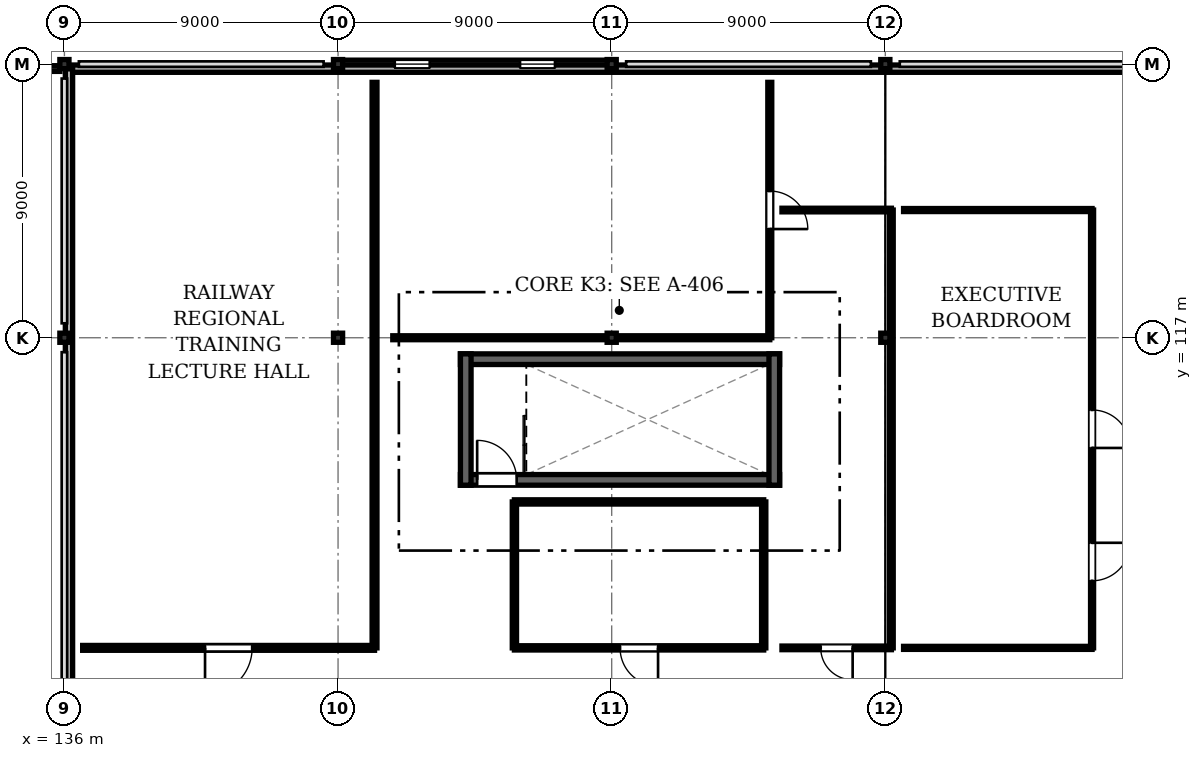
"""IFC4 building model, lengths in metres.
Left out: names, types, materials, properties, quantities, classifications, styles, units other than length and angle.
Written with IfcOpenShell. Run it as: python <this file> out.ifc"""

import sys

from ifc_helpers import new_model, si_unit, direction, frame, frame_2d, origin, origin_2d, place, context, subcontext, project, spatial, rectangle, i_section, extrude, element, fill, save


model = new_model("IFC4")
c1 = context("Model", 3, precision=1e-05, world=origin(), true_north=direction((0.0, 1.0)))
c2 = subcontext(c1, "Body", "Model", "MODEL_VIEW")
j1 = project(units=[si_unit("LENGTHUNIT", "METRE"), si_unit("PLANEANGLEUNIT", "RADIAN")], contexts=[c1])
p1 = place(None, origin())
s1 = spatial("IfcSite", under=j1, at=p1, CompositionType="ELEMENT")
p2 = place(p1, origin())
s2 = spatial("IfcBuilding", under=s1, at=p2, CompositionType="ELEMENT")
p3 = place(p2, frame((0.0, 0.0, 20.8)))
s3 = spatial("IfcBuildingStorey", under=s2, at=p3, CompositionType="ELEMENT", Elevation=20.8)
for number, where, z_axis, x_axis in (
    (1, (136.0, 117.0, 0.0), (0.0, 0.0, 1.0), (1.0, 0.0, 0.0)),
    (2, (136.0, 126.0, 0.0), (0.0, 0.0, 1.0), (1.0, 0.0, 0.0)),
    (3, (145.0, 117.0, 0.0), (0.0, 0.0, 1.0), (1.0, 0.0, 0.0)),
    (4, (145.0, 126.0, 0.0), (0.0, 0.0, 1.0), (1.0, 0.0, 0.0)),
    (5, (154.0, 117.0, 0.0), (0.0, 0.0, 1.0), (1.0, 0.0, 0.0)),
    (6, (154.0, 126.0, 0.0), (0.0, 0.0, 1.0), (1.0, 0.0, 0.0)),
    (7, (163.0, 117.0, 0.0), (0.0, 0.0, 1.0), (1.0, 0.0, 0.0)),
    (8, (163.0, 126.0, 0.0), (0.0, 0.0, 1.0), (1.0, 0.0, 0.0)),
):
    element("IfcColumn", number, at=place(p3, frame(where, z_axis=z_axis, x_axis=x_axis)), inside=s3, PredefinedType="COLUMN", context=c2, shape_type="SweptSolid", body=[
        extrude(i_section(OverallWidth=0.3, OverallDepth=0.3, WebThickness=0.01, FlangeThickness=0.015, FilletRadius=0.018, at=origin_2d()), origin(), (0.0, 0.0, 1.0), 2.85),
    ])
p4 = place(p3, frame((145.005, 126.0, 0.0), z_axis=(0.0, 0.0, 1.0), x_axis=(1.0, 0.0, 0.0)))
e9 = element("IfcWall", 9, at=p4, inside=s3, PredefinedType="SOLIDWALL", context=c2, shape_type="SweptSolid", body=[
    extrude(rectangle(XDim=8.99, YDim=0.26, at=frame_2d((4.495, 0.0))), origin(), (0.0, 0.0, 1.0), 2.23),
])
p5 = place(p4, frame((1.86, 0.0, 0.7)))
e10 = element("IfcOpeningElement", 10, at=p5, cuts=e9, PredefinedType="OPENING", context=c2, shape_type="SweptSolid", body=[
    extrude(rectangle(XDim=1.15, YDim=1.45, at=frame_2d((0.575, 0.725))), frame((0.0, 0.14, 0.0), z_axis=(0.0, -1.0, 0.0), x_axis=(1.0, 0.0, 0.0)), (0.0, 0.0, 1.0), 0.28),
])
p6 = place(p4, frame((5.98, 0.0, 0.7)))
e11 = element("IfcOpeningElement", 11, at=p6, cuts=e9, PredefinedType="OPENING", context=c2, shape_type="SweptSolid", body=[
    extrude(rectangle(XDim=1.15, YDim=1.45, at=frame_2d((0.575, 0.725))), frame((0.0, 0.14, 0.0), z_axis=(0.0, -1.0, 0.0), x_axis=(1.0, 0.0, 0.0)), (0.0, 0.0, 1.0), 0.28),
])
p7 = place(p3, frame((126.15, 125.85, 0.0), z_axis=(0.0, 0.0, 1.0), x_axis=(1.0, 0.0, 0.0)))
e12 = element("IfcWall", 12, at=p7, inside=s3, PredefinedType="PARAPET", context=c2, shape_type="SweptSolid", body=[
    extrude(rectangle(XDim=9.7, YDim=0.18, at=frame_2d((4.85, 0.0))), origin(), (0.0, 0.0, 1.0), 1.15),
])
p8 = place(p3, frame((187.85, 125.85, 2.85), z_axis=(0.0, 0.0, 1.0), x_axis=(-1.0, 0.0, 0.0)))
e13 = element("IfcWall", 13, at=p8, inside=s3, PredefinedType="PARAPET", context=c2, shape_type="SweptSolid", body=[
    extrude(rectangle(XDim=51.7, YDim=0.24, at=frame_2d((25.85, 0.0))), origin(), (0.0, 0.0, 1.0), 0.34),
])
p9 = place(p3, frame((136.15, 125.85, 2.85), z_axis=(0.0, 0.0, 1.0), x_axis=(0.0, -1.0, 0.0)))
e14 = element("IfcWall", 14, at=p9, inside=s3, PredefinedType="PARAPET", context=c2, shape_type="SweptSolid", body=[
    extrude(rectangle(XDim=22.2, YDim=0.24, at=frame_2d((11.1, 0.0))), origin(), (0.0, 0.0, 1.0), 0.34),
])
p10 = place(p3, frame((149.025, 112.325, 0.0), z_axis=(0.0, 0.0, 1.0), x_axis=(1.0, 0.0, 0.0)))
e15 = element("IfcWall", 15, at=p10, inside=s3, PredefinedType="SHEAR", context=c2, shape_type="SweptSolid", body=[
    extrude(rectangle(XDim=10.498, YDim=0.35, at=frame_2d((5.249, 0.0))), origin(), (0.0, 0.0, 1.0), 2.645),
])
p11 = place(p10, frame((0.55, 0.0, 0.0)))
e16 = element("IfcOpeningElement", 16, at=p11, cuts=e15, PredefinedType="OPENING", context=c2, shape_type="SweptSolid", body=[
    extrude(rectangle(XDim=1.3, YDim=2.1, at=frame_2d((0.65, 1.05))), frame((0.0, 0.185, 0.0), z_axis=(0.0, -1.0, 0.0), x_axis=(1.0, 0.0, 0.0)), (0.0, 0.0, 1.0), 0.37),
])
p12 = place(p3, frame((159.522, 116.295, 0.0), z_axis=(0.0, 0.0, 1.0), x_axis=(-1.0, 0.0, 0.0)))
e17 = element("IfcWall", 17, at=p12, inside=s3, PredefinedType="SHEAR", context=c2, shape_type="SweptSolid", body=[
    extrude(rectangle(XDim=10.498, YDim=0.35, at=frame_2d((5.249, 0.0))), origin(), (0.0, 0.0, 1.0), 2.645),
])
for number, where, z_axis, x_axis in (
    (18, (159.347, 112.15, 0.0), (0.0, 0.0, 1.0), (0.0, 1.0, 0.0)),
    (19, (149.2, 116.47, 0.0), (0.0, 0.0, 1.0), (0.0, -1.0, 0.0)),
):
    element("IfcWall", number, at=place(p3, frame(where, z_axis=z_axis, x_axis=x_axis)), inside=s3, PredefinedType="SHEAR", context=c2, shape_type="SweptSolid", body=[
        extrude(rectangle(XDim=4.32, YDim=0.35, at=frame_2d((2.16, 0.0))), origin(), (0.0, 0.0, 1.0), 2.645),
    ])
p13 = place(p3, frame((146.2, 106.8, 0.0), z_axis=(0.0, 0.0, 1.0), x_axis=(-1.0, 0.0, 0.0)))
e20 = element("IfcWall", 20, at=p13, inside=s3, PredefinedType="PARTITIONING", context=c2, shape_type="SweptSolid", body=[
    extrude(rectangle(XDim=9.6, YDim=0.16, at=frame_2d((4.8, 0.0))), origin(), (0.0, 0.0, 1.0), 2.18),
])
p14 = place(p13, frame((4.025, 0.0, 0.0)))
e21 = element("IfcOpeningElement", 21, at=p14, cuts=e20, PredefinedType="OPENING", context=c2, shape_type="SweptSolid", body=[
    extrude(rectangle(XDim=1.55, YDim=2.1, at=frame_2d((0.775, 1.05))), frame((0.0, 0.09, 0.0), z_axis=(0.0, -1.0, 0.0), x_axis=(1.0, 0.0, 0.0)), (0.0, 0.0, 1.0), 0.18),
])
p15 = place(p3, frame((146.2, 125.4, 0.0), z_axis=(0.0, 0.0, 1.0), x_axis=(0.0, -1.0, 0.0)))
e22 = element("IfcWall", 22, at=p15, inside=s3, PredefinedType="PARTITIONING", context=c2, shape_type="SweptSolid", body=[
    extrude(rectangle(XDim=18.6, YDim=0.16, at=frame_2d((9.3, 0.0))), origin(), (0.0, 0.0, 1.0), 2.23),
])
p16 = place(p3, frame((159.0, 106.8, 0.0), z_axis=(0.0, 0.0, 1.0), x_axis=(-1.0, 0.0, 0.0)))
e23 = element("IfcWall", 23, at=p16, inside=s3, PredefinedType="PARTITIONING", context=c2, shape_type="SweptSolid", body=[
    extrude(rectangle(XDim=8.2, YDim=0.14, at=frame_2d((4.1, 0.0))), origin(), (0.0, 0.0, 1.0), 2.18),
])
p17 = place(p16, frame((3.475, 0.0, 0.0)))
e24 = element("IfcOpeningElement", 24, at=p17, cuts=e23, PredefinedType="OPENING", context=c2, shape_type="SweptSolid", body=[
    extrude(rectangle(XDim=1.25, YDim=2.1, at=frame_2d((0.625, 1.05))), frame((0.0, 0.08, 0.0), z_axis=(0.0, -1.0, 0.0), x_axis=(1.0, 0.0, 0.0)), (0.0, 0.0, 1.0), 0.16),
])
p18 = place(p3, frame((150.8, 111.6, 0.0), z_axis=(0.0, 0.0, 1.0), x_axis=(1.0, 0.0, 0.0)))
e25 = element("IfcWall", 25, at=p18, inside=s3, PredefinedType="PARTITIONING", context=c2, shape_type="SweptSolid", body=[
    extrude(rectangle(XDim=8.2, YDim=0.14, at=frame_2d((4.1, 0.0))), origin(), (0.0, 0.0, 1.0), 2.18),
])
p19 = place(p3, frame((150.8, 106.8, 0.0), z_axis=(0.0, 0.0, 1.0), x_axis=(0.0, 1.0, 0.0)))
e26 = element("IfcWall", 26, at=p19, inside=s3, PredefinedType="PARTITIONING", context=c2, shape_type="SweptSolid", body=[
    extrude(rectangle(XDim=4.8, YDim=0.14, at=frame_2d((2.4, 0.0))), origin(), (0.0, 0.0, 1.0), 2.62),
])
p20 = place(p3, frame((159.0, 111.6, 0.0), z_axis=(0.0, 0.0, 1.0), x_axis=(0.0, -1.0, 0.0)))
e27 = element("IfcWall", 27, at=p20, inside=s3, PredefinedType="PARTITIONING", context=c2, shape_type="SweptSolid", body=[
    extrude(rectangle(XDim=4.8, YDim=0.14, at=frame_2d((2.4, 0.0))), origin(), (0.0, 0.0, 1.0), 2.22),
])
p21 = place(p3, frame((159.2, 117.0, 0.0), z_axis=(0.0, 0.0, 1.0), x_axis=(-1.0, 0.0, 0.0)))
e28 = element("IfcWall", 28, at=p21, inside=s3, PredefinedType="PARTITIONING", context=c2, shape_type="SweptSolid", body=[
    extrude(rectangle(XDim=12.4, YDim=0.13, at=frame_2d((6.2, 0.0))), origin(), (0.0, 0.0, 1.0), 2.18),
])
p22 = place(p3, frame((159.2, 125.4, 0.0), z_axis=(0.0, 0.0, 1.0), x_axis=(0.0, -1.0, 0.0)))
e29 = element("IfcWall", 29, at=p22, inside=s3, PredefinedType="PARTITIONING", context=c2, shape_type="SweptSolid", body=[
    extrude(rectangle(XDim=8.4, YDim=0.13, at=frame_2d((4.2, 0.0))), origin(), (0.0, 0.0, 1.0), 2.22),
])
p23 = place(p22, frame((3.575, 0.0, 0.0)))
e30 = element("IfcOpeningElement", 30, at=p23, cuts=e29, PredefinedType="OPENING", context=c2, shape_type="SweptSolid", body=[
    extrude(rectangle(XDim=1.25, YDim=2.1, at=frame_2d((0.625, 1.05))), frame((0.0, 0.075, 0.0), z_axis=(0.0, -1.0, 0.0), x_axis=(1.0, 0.0, 0.0)), (0.0, 0.0, 1.0), 0.15),
])
p24 = place(p3, frame((163.2, 106.8, 0.0), z_axis=(0.0, 0.0, 1.0), x_axis=(-1.0, 0.0, 0.0)))
e31 = element("IfcWall", 31, at=p24, inside=s3, PredefinedType="PARTITIONING", context=c2, shape_type="SweptSolid", body=[
    extrude(rectangle(XDim=3.6, YDim=0.12, at=frame_2d((1.8, 0.0))), origin(), (0.0, 0.0, 1.0), 2.18),
])
p25 = place(p24, frame((1.275, 0.0, 0.0)))
e32 = element("IfcOpeningElement", 32, at=p25, cuts=e31, PredefinedType="OPENING", context=c2, shape_type="SweptSolid", body=[
    extrude(rectangle(XDim=1.05, YDim=2.1, at=frame_2d((0.525, 1.05))), frame((0.0, 0.07, 0.0), z_axis=(0.0, -1.0, 0.0), x_axis=(1.0, 0.0, 0.0)), (0.0, 0.0, 1.0), 0.14),
])
p26 = place(p3, frame((159.6, 121.2, 0.0), z_axis=(0.0, 0.0, 1.0), x_axis=(1.0, 0.0, 0.0)))
e33 = element("IfcWall", 33, at=p26, inside=s3, PredefinedType="PARTITIONING", context=c2, shape_type="SweptSolid", body=[
    extrude(rectangle(XDim=3.6, YDim=0.12, at=frame_2d((1.8, 0.0))), origin(), (0.0, 0.0, 1.0), 2.23),
])
p27 = place(p3, frame((163.2, 121.2, 0.0), z_axis=(0.0, 0.0, 1.0), x_axis=(0.0, -1.0, 0.0)))
e34 = element("IfcWall", 34, at=p27, inside=s3, PredefinedType="PARTITIONING", context=c2, shape_type="SweptSolid", body=[
    extrude(rectangle(XDim=14.4, YDim=0.12, at=frame_2d((7.2, 0.0))), origin(), (0.0, 0.0, 1.0), 2.18),
])
p28 = place(p3, frame((169.8, 106.8, 0.0), z_axis=(0.0, 0.0, 1.0), x_axis=(-1.0, 0.0, 0.0)))
e35 = element("IfcWall", 35, at=p28, inside=s3, PredefinedType="PARTITIONING", context=c2, shape_type="SweptSolid", body=[
    extrude(rectangle(XDim=6.2, YDim=0.1, at=frame_2d((3.1, 0.0))), origin(), (0.0, 0.0, 1.0), 2.18),
])
p29 = place(p3, frame((163.6, 121.2, 0.0), z_axis=(0.0, 0.0, 1.0), x_axis=(1.0, 0.0, 0.0)))
e36 = element("IfcWall", 36, at=p29, inside=s3, PredefinedType="PARTITIONING", context=c2, shape_type="SweptSolid", body=[
    extrude(rectangle(XDim=6.2, YDim=0.1, at=frame_2d((3.1, 0.0))), origin(), (0.0, 0.0, 1.0), 2.23),
])
p30 = place(p3, frame((169.8, 121.2, 0.0), z_axis=(0.0, 0.0, 1.0), x_axis=(0.0, -1.0, 0.0)))
e37 = element("IfcWall", 37, at=p30, inside=s3, PredefinedType="PARTITIONING", context=c2, shape_type="SweptSolid", body=[
    extrude(rectangle(XDim=14.4, YDim=0.1, at=frame_2d((7.2, 0.0))), origin(), (0.0, 0.0, 1.0), 2.23),
])
p31 = place(p30, frame((6.575, 0.0, 0.0)))
e38 = element("IfcOpeningElement", 38, at=p31, cuts=e37, PredefinedType="OPENING", context=c2, shape_type="SweptSolid", body=[
    extrude(rectangle(XDim=1.25, YDim=2.1, at=frame_2d((0.625, 1.05))), frame((0.0, 0.06, 0.0), z_axis=(0.0, -1.0, 0.0), x_axis=(1.0, 0.0, 0.0)), (0.0, 0.0, 1.0), 0.12),
])
p32 = place(p30, frame((10.944, 0.0, 0.0)))
e39 = element("IfcOpeningElement", 39, at=p32, cuts=e37, PredefinedType="OPENING", context=c2, shape_type="SweptSolid", body=[
    extrude(rectangle(XDim=1.25, YDim=2.1, at=frame_2d((0.625, 1.05))), frame((0.0, 0.06, 0.0), z_axis=(0.0, -1.0, 0.0), x_axis=(1.0, 0.0, 0.0)), (0.0, 0.0, 1.0), 0.12),
])
p33 = place(p5, origin())
e40 = element("IfcWindow", 40, at=p33, inside=s3, PartitioningType="SINGLE_PANEL", PredefinedType="WINDOW", context=c2, shape_type="SweptSolid", body=[
    extrude(rectangle(XDim=1.15, YDim=1.45, at=frame_2d((0.575, 0.725))), frame((0.0, 0.03, 0.0), z_axis=(0.0, -1.0, 0.0), x_axis=(1.0, 0.0, 0.0)), (0.0, 0.0, 1.0), 0.06),
])
fill(e10, e40)
p34 = place(p6, origin())
e41 = element("IfcWindow", 41, at=p34, inside=s3, PartitioningType="SINGLE_PANEL", PredefinedType="WINDOW", context=c2, shape_type="SweptSolid", body=[
    extrude(rectangle(XDim=1.15, YDim=1.45, at=frame_2d((0.575, 0.725))), frame((0.0, 0.03, 0.0), z_axis=(0.0, -1.0, 0.0), x_axis=(1.0, 0.0, 0.0)), (0.0, 0.0, 1.0), 0.06),
])
fill(e11, e41)
p35 = place(p11, origin())
e42 = element("IfcDoor", 42, at=p35, inside=s3, OperationType="SINGLE_SWING_LEFT", PredefinedType="DOOR", context=c2, shape_type="SweptSolid", body=[
    extrude(rectangle(XDim=1.3, YDim=2.1, at=frame_2d((0.65, 1.05))), frame((0.0, 0.025, 0.0), z_axis=(0.0, -1.0, 0.0), x_axis=(1.0, 0.0, 0.0)), (0.0, 0.0, 1.0), 0.05),
])
fill(e16, e42)
p36 = place(p14, origin())
e43 = element("IfcDoor", 43, at=p36, inside=s3, OperationType="SINGLE_SWING_RIGHT", PredefinedType="DOOR", context=c2, shape_type="SweptSolid", body=[
    extrude(rectangle(XDim=1.55, YDim=2.1, at=frame_2d((0.775, 1.05))), frame((0.0, 0.025, 0.0), z_axis=(0.0, -1.0, 0.0), x_axis=(1.0, 0.0, 0.0)), (0.0, 0.0, 1.0), 0.05),
])
fill(e21, e43)
p37 = place(p17, origin())
e44 = element("IfcDoor", 44, at=p37, inside=s3, OperationType="SINGLE_SWING_LEFT", PredefinedType="DOOR", context=c2, shape_type="SweptSolid", body=[
    extrude(rectangle(XDim=1.25, YDim=2.1, at=frame_2d((0.625, 1.05))), frame((0.0, 0.025, 0.0), z_axis=(0.0, -1.0, 0.0), x_axis=(1.0, 0.0, 0.0)), (0.0, 0.0, 1.0), 0.05),
])
fill(e24, e44)
p38 = place(p23, origin())
e45 = element("IfcDoor", 45, at=p38, inside=s3, OperationType="SINGLE_SWING_RIGHT", PredefinedType="DOOR", context=c2, shape_type="SweptSolid", body=[
    extrude(rectangle(XDim=1.25, YDim=2.1, at=frame_2d((0.625, 1.05))), frame((0.0, 0.025, 0.0), z_axis=(0.0, -1.0, 0.0), x_axis=(1.0, 0.0, 0.0)), (0.0, 0.0, 1.0), 0.05),
])
fill(e30, e45)
p39 = place(p25, origin())
e46 = element("IfcDoor", 46, at=p39, inside=s3, OperationType="SINGLE_SWING_LEFT", PredefinedType="DOOR", context=c2, shape_type="SweptSolid", body=[
    extrude(rectangle(XDim=1.05, YDim=2.1, at=frame_2d((0.525, 1.05))), frame((0.0, 0.025, 0.0), z_axis=(0.0, -1.0, 0.0), x_axis=(1.0, 0.0, 0.0)), (0.0, 0.0, 1.0), 0.05),
])
fill(e32, e46)
p40 = place(p31, origin())
e47 = element("IfcDoor", 47, at=p40, inside=s3, OperationType="SINGLE_SWING_RIGHT", PredefinedType="DOOR", context=c2, shape_type="SweptSolid", body=[
    extrude(rectangle(XDim=1.25, YDim=2.1, at=frame_2d((0.625, 1.05))), frame((0.0, 0.025, 0.0), z_axis=(0.0, -1.0, 0.0), x_axis=(1.0, 0.0, 0.0)), (0.0, 0.0, 1.0), 0.05),
])
fill(e38, e47)
p41 = place(p32, origin())
e48 = element("IfcDoor", 48, at=p41, inside=s3, OperationType="SINGLE_SWING_LEFT", PredefinedType="DOOR", context=c2, shape_type="SweptSolid", body=[
    extrude(rectangle(XDim=1.25, YDim=2.1, at=frame_2d((0.625, 1.05))), frame((0.0, 0.025, 0.0), z_axis=(0.0, -1.0, 0.0), x_axis=(1.0, 0.0, 0.0)), (0.0, 0.0, 1.0), 0.05),
])
fill(e39, e48)
save(model, sys.argv[1])
